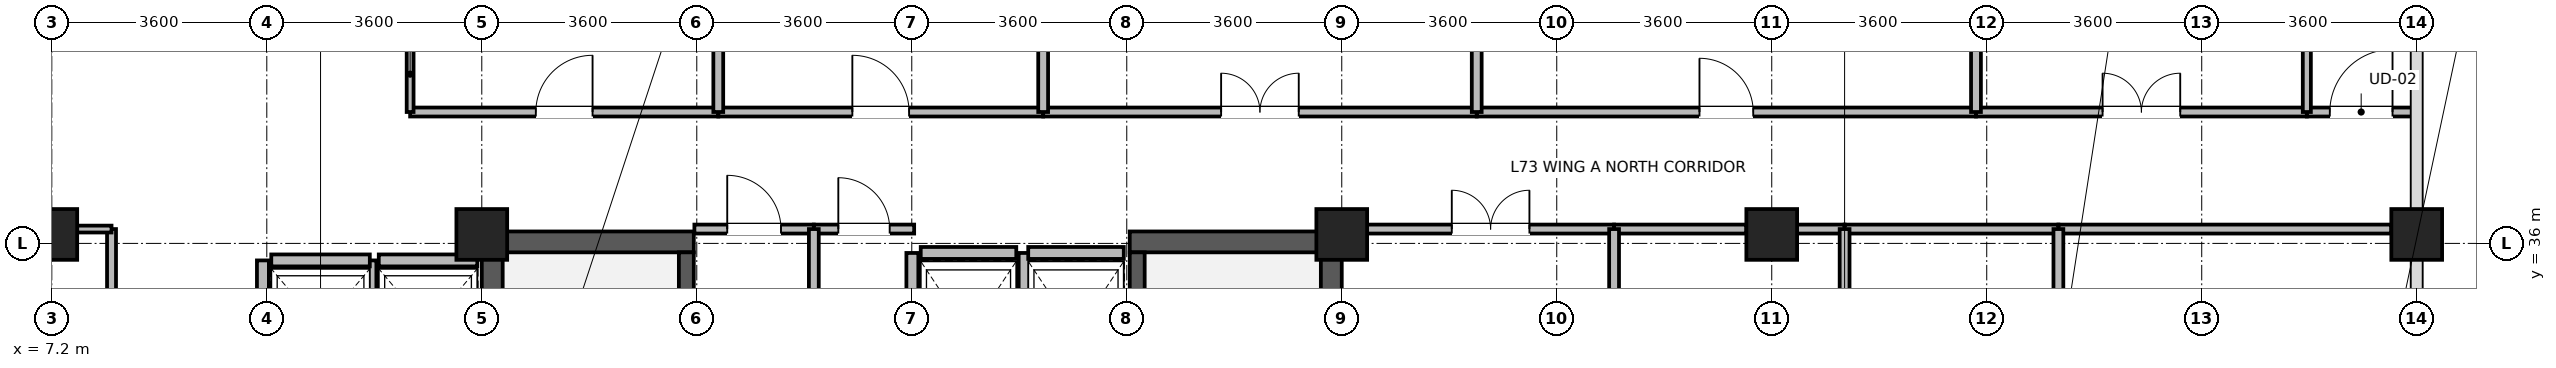
"""IFC4 building model, lengths in metres.
Left out: names, types, materials, properties, quantities, classifications, styles, units other than length and angle.
Written with IfcOpenShell. Run it as: python <this file> out.ifc"""

import sys

from ifc_helpers import new_model, si_unit, direction, frame, frame_2d, origin, origin_2d, place, context, subcontext, project, spatial, rectangle, extrude, source, transform, mapped, element, fill, save


model = new_model("IFC4")
c1 = context("Model", 3, precision=1e-05, world=origin(), true_north=direction((0.0, 1.0)))
c2 = subcontext(c1, "Body", "Model", "MODEL_VIEW")
j1 = project(units=[si_unit("LENGTHUNIT", "METRE"), si_unit("PLANEANGLEUNIT", "RADIAN")], contexts=[c1])
p1 = place(None, origin())
s1 = spatial("IfcSite", under=j1, at=p1, CompositionType="ELEMENT")
p2 = place(p1, origin())
s2 = spatial("IfcBuilding", under=s1, at=p2, CompositionType="ELEMENT")
p3 = place(p2, frame((0.0, 0.0, 283.2)))
s3 = spatial("IfcBuildingStorey", under=s2, at=p3, CompositionType="ELEMENT", Elevation=283.2)
for number, where, z_axis, x_axis in (
    (1, (14.575, 28.5, 0.0), (0.0, 0.0, 1.0), (0.0, 1.0, 0.0)),
    (2, (28.625, 28.5, 0.0), (0.0, 0.0, 1.0), (0.0, 1.0, 0.0)),
):
    element("IfcWall", number, at=place(p3, frame(where, z_axis=z_axis, x_axis=x_axis)), inside=s3, PredefinedType="SHEAR", context=c2, shape_type="SweptSolid", body=[
        extrude(rectangle(XDim=7.7, YDim=0.35, at=frame_2d((3.85, 0.0))), origin(), (0.0, 0.0, 1.0), 3.475),
    ])
for number, where, z_axis, x_axis in (
    (3, (14.75, 36.025, 0.0), (0.0, 0.0, 1.0), (1.0, 0.0, 0.0)),
    (4, (25.25, 36.025, 0.0), (0.0, 0.0, 1.0), (1.0, 0.0, 0.0)),
):
    element("IfcWall", number, at=place(p3, frame(where, z_axis=z_axis, x_axis=x_axis)), inside=s3, PredefinedType="SHEAR", context=c2, shape_type="SweptSolid", body=[
        extrude(rectangle(XDim=3.2, YDim=0.35, at=frame_2d((1.6, 0.0))), origin(), (0.0, 0.0, 1.0), 3.475),
    ])
p4 = place(p3, frame((17.825, 28.85, 0.0), z_axis=(0.0, 0.0, 1.0), x_axis=(0.0, 1.0, 0.0)))
e5 = element("IfcWall", 5, at=p4, inside=s3, PredefinedType="SHEAR", context=c2, shape_type="SweptSolid", body=[
    extrude(rectangle(XDim=7.0, YDim=0.25, at=frame_2d((3.5, 0.0))), origin(), (0.0, 0.0, 1.0), 3.475),
])
p5 = place(p4, frame((0.15, 0.0, 0.0)))
e6 = element("IfcOpeningElement", 6, at=p5, cuts=e5, PredefinedType="OPENING", context=c2, shape_type="SweptSolid", body=[
    extrude(rectangle(XDim=1.1, YDim=2.08, at=frame_2d((0.55, 1.04))), frame((0.0, 0.135, 0.0), z_axis=(0.0, -1.0, 0.0), x_axis=(1.0, 0.0, 0.0)), (0.0, 0.0, 1.0), 0.27),
])
p6 = place(p3, frame((25.375, 28.85, 0.0), z_axis=(0.0, 0.0, 1.0), x_axis=(0.0, 1.0, 0.0)))
e7 = element("IfcWall", 7, at=p6, inside=s3, PredefinedType="SHEAR", context=c2, shape_type="SweptSolid", body=[
    extrude(rectangle(XDim=7.0, YDim=0.25, at=frame_2d((3.5, 0.0))), origin(), (0.0, 0.0, 1.0), 3.475),
])
p7 = place(p6, frame((0.15, 0.0, 0.0)))
e8 = element("IfcOpeningElement", 8, at=p7, cuts=e7, PredefinedType="OPENING", context=c2, shape_type="SweptSolid", body=[
    extrude(rectangle(XDim=1.1, YDim=2.08, at=frame_2d((0.55, 1.04))), frame((0.0, 0.135, 0.0), z_axis=(0.0, -1.0, 0.0), x_axis=(1.0, 0.0, 0.0)), (0.0, 0.0, 1.0), 0.27),
])
m1 = source(origin(), c2, "Body", "SweptSolid", [
    extrude(rectangle(XDim=0.85, YDim=0.85, at=origin_2d()), origin(), (0.0, 0.0, 1.0), 3.7),
])
for number, where, z_axis, x_axis in (
    (9, (7.2, 36.15, 0.0), (0.0, 0.0, 1.0), (1.0, 0.0, 0.0)),
    (10, (14.4, 36.15, 0.0), (0.0, 0.0, 1.0), (1.0, 0.0, 0.0)),
    (11, (28.8, 36.15, 0.0), (0.0, 0.0, 1.0), (1.0, 0.0, 0.0)),
    (12, (36.0, 36.15, 0.0), (0.0, 0.0, 1.0), (1.0, 0.0, 0.0)),
    (13, (46.8, 36.15, 0.0), (0.0, 0.0, 1.0), (1.0, 0.0, 0.0)),
):
    element("IfcColumn", number, at=place(p3, frame(where, z_axis=z_axis, x_axis=x_axis)), inside=s3, PredefinedType="COLUMN", context=c2, shape_type="MappedRepresentation", body=[
        mapped(m1, transform((0.0, 0.0, 0.0), x_axis=(1.0, 0.0, 0.0), y_axis=(0.0, 1.0, 0.0), z_axis=(0.0, 0.0, 1.0), scale=1.0)),
    ])
p8 = place(p3, frame((12.675, 35.715, 0.0), z_axis=(0.0, 0.0, 1.0), x_axis=(1.0, 0.0, 0.0)))
e14 = element("IfcWall", 14, at=p8, inside=s3, PredefinedType="PARTITIONING", context=c2, shape_type="SweptSolid", body=[
    extrude(rectangle(XDim=1.65, YDim=0.2, at=frame_2d((0.825, 0.0))), origin(), (0.0, 0.0, 1.0), 3.455),
])
p9 = place(p3, frame((12.535, 33.485, 0.0), z_axis=(0.0, 0.0, 1.0), x_axis=(0.0, 1.0, 0.0)))
e15 = element("IfcWall", 15, at=p9, inside=s3, PredefinedType="PARTITIONING", context=c2, shape_type="SweptSolid", body=[
    extrude(rectangle(XDim=2.23, YDim=0.2, at=frame_2d((1.115, 0.0))), origin(), (0.0, 0.0, 1.0), 3.455),
])
p10 = place(p3, frame((10.875, 35.715, 0.0), z_axis=(0.0, 0.0, 1.0), x_axis=(1.0, 0.0, 0.0)))
e16 = element("IfcWall", 16, at=p10, inside=s3, PredefinedType="PARTITIONING", context=c2, shape_type="SweptSolid", body=[
    extrude(rectangle(XDim=1.65, YDim=0.2, at=frame_2d((0.825, 0.0))), origin(), (0.0, 0.0, 1.0), 3.455),
])
p11 = place(p3, frame((10.735, 33.485, 0.0), z_axis=(0.0, 0.0, 1.0), x_axis=(0.0, 1.0, 0.0)))
e17 = element("IfcWall", 17, at=p11, inside=s3, PredefinedType="PARTITIONING", context=c2, shape_type="SweptSolid", body=[
    extrude(rectangle(XDim=2.23, YDim=0.2, at=frame_2d((1.115, 0.0))), origin(), (0.0, 0.0, 1.0), 3.455),
])
p12 = place(p3, frame((21.75, 35.84, 0.0), z_axis=(0.0, 0.0, 1.0), x_axis=(1.0, 0.0, 0.0)))
e18 = element("IfcWall", 18, at=p12, inside=s3, PredefinedType="PARTITIONING", context=c2, shape_type="SweptSolid", body=[
    extrude(rectangle(XDim=1.6, YDim=0.2, at=frame_2d((0.8, 0.0))), origin(), (0.0, 0.0, 1.0), 2.555),
])
for number, where, z_axis, x_axis in (
    (19, (21.61, 33.16, 0.0), (0.0, 0.0, 1.0), (0.0, 1.0, 0.0)),
    (20, (23.49, 33.16, 0.0), (0.0, 0.0, 1.0), (0.0, 1.0, 0.0)),
):
    element("IfcWall", number, at=place(p3, frame(where, z_axis=z_axis, x_axis=x_axis)), inside=s3, PredefinedType="PARTITIONING", context=c2, shape_type="SweptSolid", body=[
        extrude(rectangle(XDim=2.68, YDim=0.2, at=frame_2d((1.34, 0.0))), origin(), (0.0, 0.0, 1.0), 3.455),
    ])
p13 = place(p3, frame((23.55, 35.84, 0.0), z_axis=(0.0, 0.0, 1.0), x_axis=(1.0, 0.0, 0.0)))
e21 = element("IfcWall", 21, at=p13, inside=s3, PredefinedType="PARTITIONING", context=c2, shape_type="SweptSolid", body=[
    extrude(rectangle(XDim=1.6, YDim=0.2, at=frame_2d((0.8, 0.0))), origin(), (0.0, 0.0, 1.0), 2.555),
])
p14 = place(p3, frame((31.06, 38.2, 0.0), z_axis=(0.0, 0.0, 1.0), x_axis=(1.0, 0.0, 0.0)))
e22 = element("IfcWall", 22, at=p14, inside=s3, PredefinedType="PARTITIONING", context=c2, shape_type="SweptSolid", body=[
    extrude(rectangle(XDim=8.36, YDim=0.15, at=frame_2d((4.18, 0.0))), origin(), (0.0, 0.0, 1.0), 3.455),
])
p15 = place(p14, frame((3.73, 0.0, 0.0)))
e23 = element("IfcOpeningElement", 23, at=p15, cuts=e22, PredefinedType="OPENING", context=c2, shape_type="SweptSolid", body=[
    extrude(rectangle(XDim=0.9, YDim=2.08, at=frame_2d((0.45, 1.04))), frame((0.0, 0.085, 0.0), z_axis=(0.0, -1.0, 0.0), x_axis=(1.0, 0.0, 0.0)), (0.0, 0.0, 1.0), 0.17),
])
p16 = place(p3, frame((23.8, 38.2, 0.0), z_axis=(0.0, 0.0, 1.0), x_axis=(1.0, 0.0, 0.0)))
e24 = element("IfcWall", 24, at=p16, inside=s3, PredefinedType="PARTITIONING", context=c2, shape_type="SweptSolid", body=[
    extrude(rectangle(XDim=7.26, YDim=0.15, at=frame_2d((3.63, 0.0))), origin(), (0.0, 0.0, 1.0), 3.455),
])
p17 = place(p16, frame((2.98, 0.0, 0.0)))
e25 = element("IfcOpeningElement", 25, at=p17, cuts=e24, PredefinedType="OPENING", context=c2, shape_type="SweptSolid", body=[
    extrude(rectangle(XDim=1.3, YDim=2.12, at=frame_2d((0.65, 1.06))), frame((0.0, 0.085, 0.0), z_axis=(0.0, -1.0, 0.0), x_axis=(1.0, 0.0, 0.0)), (0.0, 0.0, 1.0), 0.17),
])
p18 = place(p3, frame((40.8, 36.24, 0.0), z_axis=(0.0, 0.0, 1.0), x_axis=(1.0, 0.0, 0.0)))
e26 = element("IfcWall", 26, at=p18, inside=s3, PredefinedType="PARTITIONING", context=c2, shape_type="SweptSolid", body=[
    extrude(rectangle(XDim=5.575, YDim=0.15, at=frame_2d((2.788, 0.0))), origin(), (0.0, 0.0, 1.0), 2.905),
])
p19 = place(p3, frame((39.42, 38.2, 0.0), z_axis=(0.0, 0.0, 1.0), x_axis=(1.0, 0.0, 0.0)))
e27 = element("IfcWall", 27, at=p19, inside=s3, PredefinedType="PARTITIONING", context=c2, shape_type="SweptSolid", body=[
    extrude(rectangle(XDim=5.54, YDim=0.15, at=frame_2d((2.77, 0.0))), origin(), (0.0, 0.0, 1.0), 3.455),
])
p20 = place(p19, frame((2.12, 0.0, 0.0)))
e28 = element("IfcOpeningElement", 28, at=p20, cuts=e27, PredefinedType="OPENING", context=c2, shape_type="SweptSolid", body=[
    extrude(rectangle(XDim=1.3, YDim=2.12, at=frame_2d((0.65, 1.06))), frame((0.0, 0.085, 0.0), z_axis=(0.0, -1.0, 0.0), x_axis=(1.0, 0.0, 0.0)), (0.0, 0.0, 1.0), 0.17),
])
p21 = place(p3, frame((18.36, 38.2, 0.0), z_axis=(0.0, 0.0, 1.0), x_axis=(1.0, 0.0, 0.0)))
e29 = element("IfcWall", 29, at=p21, inside=s3, PredefinedType="PARTITIONING", context=c2, shape_type="SweptSolid", body=[
    extrude(rectangle(XDim=5.44, YDim=0.15, at=frame_2d((2.72, 0.0))), origin(), (0.0, 0.0, 1.0), 3.455),
])
p22 = place(p21, frame((2.245, 0.0, 0.0)))
e30 = element("IfcOpeningElement", 30, at=p22, cuts=e29, PredefinedType="OPENING", context=c2, shape_type="SweptSolid", body=[
    extrude(rectangle(XDim=0.95, YDim=2.1, at=frame_2d((0.475, 1.05))), frame((0.0, 0.085, 0.0), z_axis=(0.0, -1.0, 0.0), x_axis=(1.0, 0.0, 0.0)), (0.0, 0.0, 1.0), 0.17),
])
p23 = place(p3, frame((13.2, 38.2, 0.0), z_axis=(0.0, 0.0, 1.0), x_axis=(1.0, 0.0, 0.0)))
e31 = element("IfcWall", 31, at=p23, inside=s3, PredefinedType="PARTITIONING", context=c2, shape_type="SweptSolid", body=[
    extrude(rectangle(XDim=5.16, YDim=0.15, at=frame_2d((2.58, 0.0))), origin(), (0.0, 0.0, 1.0), 3.455),
])
p24 = place(p23, frame((2.105, 0.0, 0.0)))
e32 = element("IfcOpeningElement", 32, at=p24, cuts=e31, PredefinedType="OPENING", context=c2, shape_type="SweptSolid", body=[
    extrude(rectangle(XDim=0.95, YDim=2.1, at=frame_2d((0.475, 1.05))), frame((0.0, 0.085, 0.0), z_axis=(0.0, -1.0, 0.0), x_axis=(1.0, 0.0, 0.0)), (0.0, 0.0, 1.0), 0.17),
])
p25 = place(p3, frame((29.225, 36.24, 0.0), z_axis=(0.0, 0.0, 1.0), x_axis=(1.0, 0.0, 0.0)))
e33 = element("IfcWall", 33, at=p25, inside=s3, PredefinedType="PARTITIONING", context=c2, shape_type="SweptSolid", body=[
    extrude(rectangle(XDim=4.135, YDim=0.15, at=frame_2d((2.067, 0.0))), origin(), (0.0, 0.0, 1.0), 2.905),
])
p26 = place(p25, frame((1.417, 0.0, 0.0)))
e34 = element("IfcOpeningElement", 34, at=p26, cuts=e33, PredefinedType="OPENING", context=c2, shape_type="SweptSolid", body=[
    extrude(rectangle(XDim=1.3, YDim=2.12, at=frame_2d((0.65, 1.06))), frame((0.0, 0.085, 0.0), z_axis=(0.0, -1.0, 0.0), x_axis=(1.0, 0.0, 0.0)), (0.0, 0.0, 1.0), 0.17),
])
p27 = place(p3, frame((33.36, 36.24, 0.0), z_axis=(0.0, 0.0, 1.0), x_axis=(1.0, 0.0, 0.0)))
e35 = element("IfcWall", 35, at=p27, inside=s3, PredefinedType="PARTITIONING", context=c2, shape_type="SweptSolid", body=[
    extrude(rectangle(XDim=2.215, YDim=0.15, at=frame_2d((1.107, 0.0))), origin(), (0.0, 0.0, 1.0), 2.905),
])
p28 = place(p3, frame((36.425, 36.24, 0.0), z_axis=(0.0, 0.0, 1.0), x_axis=(1.0, 0.0, 0.0)))
e36 = element("IfcWall", 36, at=p28, inside=s3, PredefinedType="PARTITIONING", context=c2, shape_type="SweptSolid", body=[
    extrude(rectangle(XDim=0.795, YDim=0.15, at=frame_2d((0.397, 0.0))), origin(), (0.0, 0.0, 1.0), 2.905),
])
p29 = place(p3, frame((8.2, 32.4, 0.0), z_axis=(0.0, 0.0, 1.0), x_axis=(0.0, 1.0, 0.0)))
e37 = element("IfcWall", 37, at=p29, inside=s3, PredefinedType="PARTITIONING", context=c2, shape_type="SweptSolid", body=[
    extrude(rectangle(XDim=3.84, YDim=0.15, at=frame_2d((1.92, 0.0))), origin(), (0.0, 0.0, 1.0), 3.455),
])
p30 = place(p29, frame((1.445, 0.0, 0.0)))
e38 = element("IfcOpeningElement", 38, at=p30, cuts=e37, PredefinedType="OPENING", context=c2, shape_type="SweptSolid", body=[
    extrude(rectangle(XDim=0.95, YDim=2.1, at=frame_2d((0.475, 1.05))), frame((0.0, 0.085, 0.0), z_axis=(0.0, -1.0, 0.0), x_axis=(1.0, 0.0, 0.0)), (0.0, 0.0, 1.0), 0.17),
])
p31 = place(p3, frame((37.22, 36.24, 0.0), z_axis=(0.0, 0.0, 1.0), x_axis=(1.0, 0.0, 0.0)))
e39 = element("IfcWall", 39, at=p31, inside=s3, PredefinedType="PARTITIONING", context=c2, shape_type="SweptSolid", body=[
    extrude(rectangle(XDim=3.58, YDim=0.15, at=frame_2d((1.79, 0.0))), origin(), (0.0, 0.0, 1.0), 2.905),
])
p32 = place(p3, frame((17.96, 36.24, 0.0), z_axis=(0.0, 0.0, 1.0), x_axis=(1.0, 0.0, 0.0)))
e40 = element("IfcWall", 40, at=p32, inside=s3, PredefinedType="PARTITIONING", context=c2, shape_type="SweptSolid", body=[
    extrude(rectangle(XDim=2.0, YDim=0.15, at=frame_2d((1.0, 0.0))), origin(), (0.0, 0.0, 1.0), 2.555),
])
p33 = place(p32, frame((0.55, 0.0, 0.0)))
e41 = element("IfcOpeningElement", 41, at=p33, cuts=e40, PredefinedType="OPENING", context=c2, shape_type="SweptSolid", body=[
    extrude(rectangle(XDim=0.9, YDim=2.08, at=frame_2d((0.45, 1.04))), frame((0.0, 0.085, 0.0), z_axis=(0.0, -1.0, 0.0), x_axis=(1.0, 0.0, 0.0)), (0.0, 0.0, 1.0), 0.17),
])
p34 = place(p3, frame((44.96, 38.2, 0.0), z_axis=(0.0, 0.0, 1.0), x_axis=(1.0, 0.0, 0.0)))
e42 = element("IfcWall", 42, at=p34, inside=s3, PredefinedType="PARTITIONING", context=c2, shape_type="SweptSolid", body=[
    extrude(rectangle(XDim=1.82, YDim=0.15, at=frame_2d((0.91, 0.0))), origin(), (0.0, 0.0, 1.0), 3.455),
])
p35 = place(p34, frame((0.385, 0.0, 0.0)))
e43 = element("IfcOpeningElement", 43, at=p35, cuts=e42, PredefinedType="OPENING", context=c2, shape_type="SweptSolid", body=[
    extrude(rectangle(XDim=1.05, YDim=2.12, at=frame_2d((0.525, 1.06))), frame((0.0, 0.085, 0.0), z_axis=(0.0, -1.0, 0.0), x_axis=(1.0, 0.0, 0.0)), (0.0, 0.0, 1.0), 0.17),
])
p36 = place(p3, frame((19.96, 36.24, 0.0), z_axis=(0.0, 0.0, 1.0), x_axis=(1.0, 0.0, 0.0)))
e44 = element("IfcWall", 44, at=p36, inside=s3, PredefinedType="PARTITIONING", context=c2, shape_type="SweptSolid", body=[
    extrude(rectangle(XDim=1.68, YDim=0.15, at=frame_2d((0.84, 0.0))), origin(), (0.0, 0.0, 1.0), 2.555),
])
p37 = place(p36, frame((0.41, 0.0, 0.0)))
e45 = element("IfcOpeningElement", 45, at=p37, cuts=e44, PredefinedType="OPENING", context=c2, shape_type="SweptSolid", body=[
    extrude(rectangle(XDim=0.86, YDim=2.02, at=frame_2d((0.43, 1.01))), frame((0.0, 0.085, 0.0), z_axis=(0.0, -1.0, 0.0), x_axis=(1.0, 0.0, 0.0)), (0.0, 0.0, 1.0), 0.17),
])
for number, where, z_axis, x_axis in (
    (46, (37.22, 28.56, 0.0), (0.0, 0.0, 1.0), (0.0, 1.0, 0.0)),
    (47, (40.8, 28.56, 0.0), (0.0, 0.0, 1.0), (0.0, 1.0, 0.0)),
):
    element("IfcWall", number, at=place(p3, frame(where, z_axis=z_axis, x_axis=x_axis)), inside=s3, PredefinedType="PARTITIONING", context=c2, shape_type="SweptSolid", body=[
        extrude(rectangle(XDim=7.68, YDim=0.165, at=frame_2d((3.84, 0.0))), origin(), (0.0, 0.0, 1.0), 3.455),
    ])
p38 = place(p3, frame((13.2, 38.2, 0.0), z_axis=(0.0, 0.0, 1.0), x_axis=(0.0, 1.0, 0.0)))
e48 = element("IfcWall", 48, at=p38, inside=s3, PredefinedType="PARTITIONING", context=c2, shape_type="SweptSolid", body=[
    extrude(rectangle(XDim=1.268, YDim=0.115, at=frame_2d((0.634, 0.0))), origin(), (0.0, 0.0, 1.0), 3.455),
])
for number, where, z_axis, x_axis in (
    (49, (18.36, 38.2, 0.0), (0.0, 0.0, 1.0), (0.0, 1.0, 0.0)),
    (50, (23.8, 38.2, 0.0), (0.0, 0.0, 1.0), (0.0, 1.0, 0.0)),
    (51, (31.06, 38.2, 0.0), (0.0, 0.0, 1.0), (0.0, 1.0, 0.0)),
    (52, (39.42, 38.2, 0.0), (0.0, 0.0, 1.0), (0.0, 1.0, 0.0)),
):
    element("IfcWall", number, at=place(p3, frame(where, z_axis=z_axis, x_axis=x_axis)), inside=s3, PredefinedType="PARTITIONING", context=c2, shape_type="SweptSolid", body=[
        extrude(rectangle(XDim=4.868, YDim=0.165, at=frame_2d((2.434, 0.0))), origin(), (0.0, 0.0, 1.0), 3.455),
    ])
p39 = place(p3, frame((44.96, 38.2, 0.0), z_axis=(0.0, 0.0, 1.0), x_axis=(0.0, 1.0, 0.0)))
e53 = element("IfcWall", 53, at=p39, inside=s3, PredefinedType="PARTITIONING", context=c2, shape_type="SweptSolid", body=[
    extrude(rectangle(XDim=4.868, YDim=0.135, at=frame_2d((2.434, 0.0))), origin(), (0.0, 0.0, 1.0), 3.455),
])
p40 = place(p3, frame((7.625, 36.24, 0.0), z_axis=(0.0, 0.0, 1.0), x_axis=(1.0, 0.0, 0.0)))
e54 = element("IfcWall", 54, at=p40, inside=s3, PredefinedType="PARTITIONING", context=c2, shape_type="SweptSolid", body=[
    extrude(rectangle(XDim=0.575, YDim=0.115, at=frame_2d((0.288, 0.0))), origin(), (0.0, 0.0, 1.0), 2.905),
])
p41 = place(p3, frame((33.36, 32.4, 0.0), z_axis=(0.0, 0.0, 1.0), x_axis=(0.0, 1.0, 0.0)))
e55 = element("IfcWall", 55, at=p41, inside=s3, PredefinedType="PARTITIONING", context=c2, shape_type="SweptSolid", body=[
    extrude(rectangle(XDim=3.84, YDim=0.165, at=frame_2d((1.92, 0.0))), origin(), (0.0, 0.0, 1.0), 3.455),
])
p42 = place(p3, frame((19.96, 33.36, 0.0), z_axis=(0.0, 0.0, 1.0), x_axis=(0.0, 1.0, 0.0)))
e56 = element("IfcWall", 56, at=p42, inside=s3, PredefinedType="PARTITIONING", context=c2, shape_type="SweptSolid", body=[
    extrude(rectangle(XDim=2.88, YDim=0.165, at=frame_2d((1.44, 0.0))), origin(), (0.0, 0.0, 1.0), 3.455),
])
p43 = place(p15, origin())
e57 = element("IfcDoor", 57, at=p43, inside=s3, OperationType="SINGLE_SWING_LEFT", PredefinedType="DOOR", context=c2, shape_type="SweptSolid", body=[
    extrude(rectangle(XDim=0.9, YDim=2.08, at=frame_2d((0.45, 1.04))), frame((0.0, 0.025, 0.0), z_axis=(0.0, -1.0, 0.0), x_axis=(1.0, 0.0, 0.0)), (0.0, 0.0, 1.0), 0.05),
])
fill(e23, e57)
p44 = place(p17, origin())
e58 = element("IfcDoor", 58, at=p44, inside=s3, OperationType="DOUBLE_DOOR_SINGLE_SWING", PredefinedType="DOOR", context=c2, shape_type="SweptSolid", body=[
    extrude(rectangle(XDim=1.3, YDim=2.12, at=frame_2d((0.65, 1.06))), frame((0.0, 0.025, 0.0), z_axis=(0.0, -1.0, 0.0), x_axis=(1.0, 0.0, 0.0)), (0.0, 0.0, 1.0), 0.05),
])
fill(e25, e58)
p45 = place(p20, origin())
e59 = element("IfcDoor", 59, at=p45, inside=s3, OperationType="DOUBLE_DOOR_SINGLE_SWING", PredefinedType="DOOR", context=c2, shape_type="SweptSolid", body=[
    extrude(rectangle(XDim=1.3, YDim=2.12, at=frame_2d((0.65, 1.06))), frame((0.0, 0.025, 0.0), z_axis=(0.0, -1.0, 0.0), x_axis=(1.0, 0.0, 0.0)), (0.0, 0.0, 1.0), 0.05),
])
fill(e28, e59)
p46 = place(p22, origin())
e60 = element("IfcDoor", 60, at=p46, inside=s3, OperationType="SINGLE_SWING_LEFT", PredefinedType="DOOR", context=c2, shape_type="SweptSolid", body=[
    extrude(rectangle(XDim=0.95, YDim=2.1, at=frame_2d((0.475, 1.05))), frame((0.0, 0.025, 0.0), z_axis=(0.0, -1.0, 0.0), x_axis=(1.0, 0.0, 0.0)), (0.0, 0.0, 1.0), 0.05),
])
fill(e30, e60)
p47 = place(p24, origin())
e61 = element("IfcDoor", 61, at=p47, inside=s3, OperationType="SINGLE_SWING_RIGHT", PredefinedType="DOOR", context=c2, shape_type="SweptSolid", body=[
    extrude(rectangle(XDim=0.95, YDim=2.1, at=frame_2d((0.475, 1.05))), frame((0.0, 0.025, 0.0), z_axis=(0.0, -1.0, 0.0), x_axis=(1.0, 0.0, 0.0)), (0.0, 0.0, 1.0), 0.05),
])
fill(e32, e61)
p48 = place(p26, origin())
e62 = element("IfcDoor", 62, at=p48, inside=s3, OperationType="DOUBLE_DOOR_SINGLE_SWING", PredefinedType="DOOR", context=c2, shape_type="SweptSolid", body=[
    extrude(rectangle(XDim=1.3, YDim=2.12, at=frame_2d((0.65, 1.06))), frame((0.0, 0.025, 0.0), z_axis=(0.0, -1.0, 0.0), x_axis=(1.0, 0.0, 0.0)), (0.0, 0.0, 1.0), 0.05),
])
fill(e34, e62)
p49 = place(p33, origin())
e63 = element("IfcDoor", 63, at=p49, inside=s3, OperationType="SINGLE_SWING_LEFT", PredefinedType="DOOR", context=c2, shape_type="SweptSolid", body=[
    extrude(rectangle(XDim=0.9, YDim=2.08, at=frame_2d((0.45, 1.04))), frame((0.0, 0.025, 0.0), z_axis=(0.0, -1.0, 0.0), x_axis=(1.0, 0.0, 0.0)), (0.0, 0.0, 1.0), 0.05),
])
fill(e41, e63)
p50 = place(p35, origin())
e64 = element("IfcDoor", 64, at=p50, inside=s3, OperationType="SINGLE_SWING_RIGHT", PredefinedType="DOOR", context=c2, shape_type="SweptSolid", body=[
    extrude(rectangle(XDim=1.05, YDim=2.12, at=frame_2d((0.525, 1.06))), frame((0.0, 0.025, 0.0), z_axis=(0.0, -1.0, 0.0), x_axis=(1.0, 0.0, 0.0)), (0.0, 0.0, 1.0), 0.05),
])
fill(e43, e64)
p51 = place(p37, origin())
e65 = element("IfcDoor", 65, at=p51, inside=s3, OperationType="SINGLE_SWING_LEFT", PredefinedType="DOOR", context=c2, shape_type="SweptSolid", body=[
    extrude(rectangle(XDim=0.86, YDim=2.02, at=frame_2d((0.43, 1.01))), frame((0.0, 0.025, 0.0), z_axis=(0.0, -1.0, 0.0), x_axis=(1.0, 0.0, 0.0)), (0.0, 0.0, 1.0), 0.05),
])
fill(e45, e65)
save(model, sys.argv[1])
